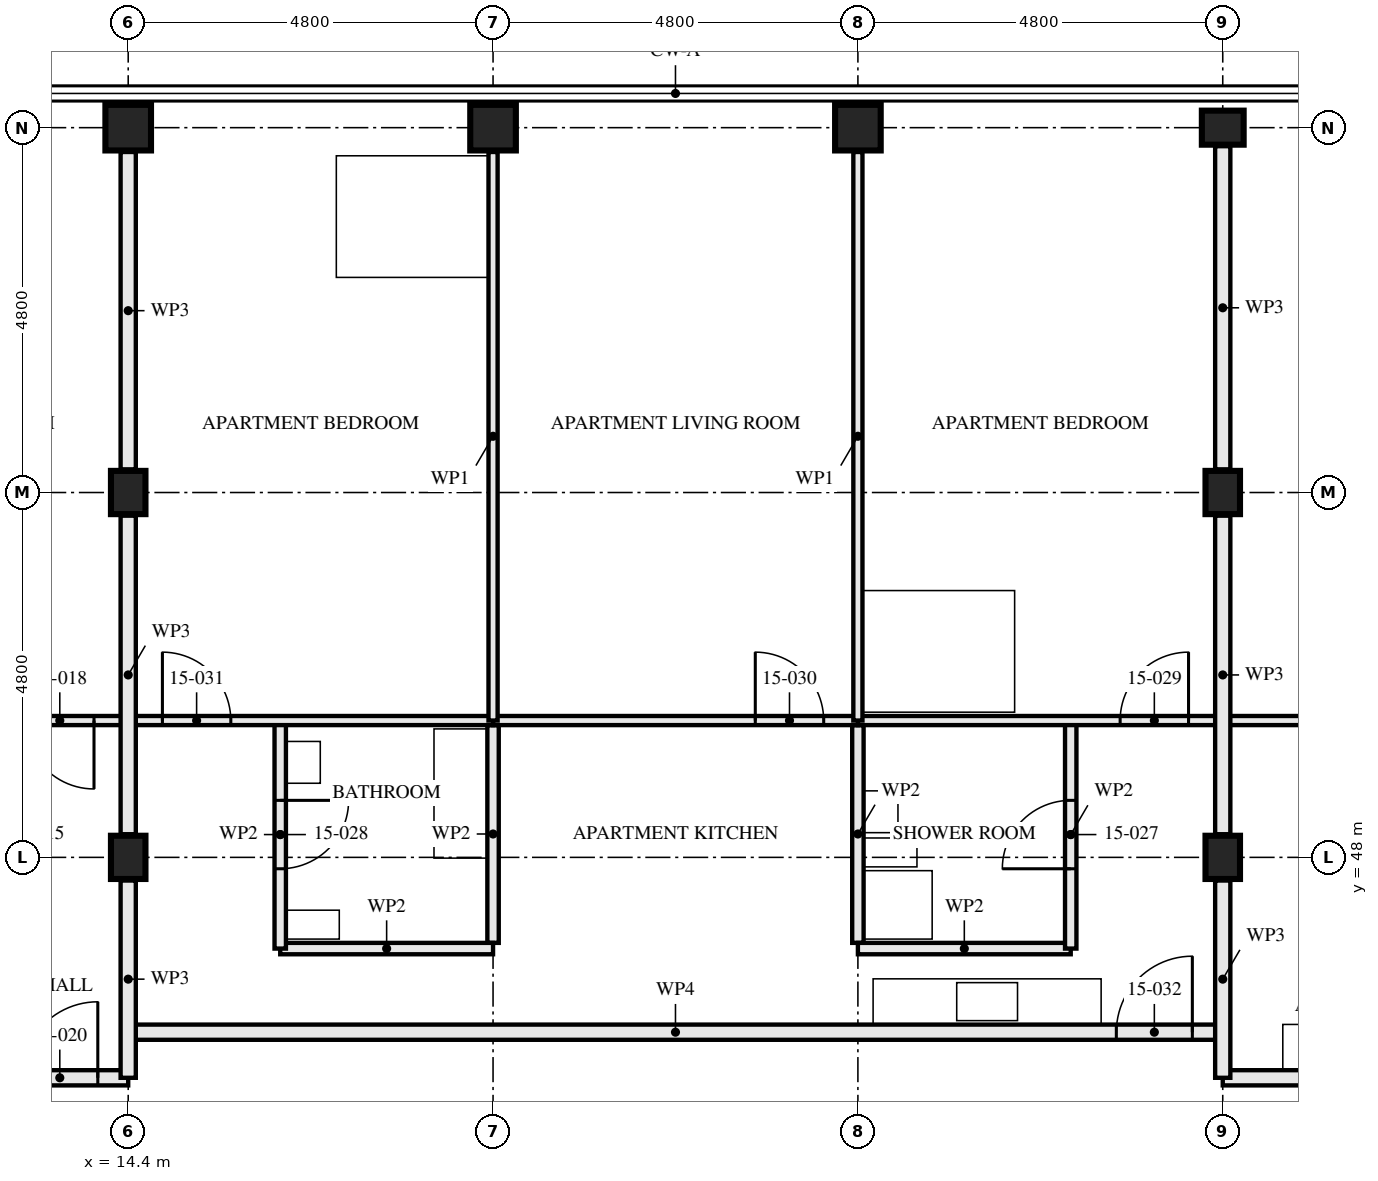
"""IFC4 building model, lengths in metres.
Left out: names, types, materials, properties, quantities, classifications, styles, units other than length and angle.
Written with IfcOpenShell. Run it as: python <this file> out.ifc"""

import sys

from ifc_helpers import new_model, si_unit, direction, frame, frame_2d, origin, origin_2d, place, context, subcontext, project, spatial, rectangle, hollow_rectangle, i_section, extrude, element, fill, save


model = new_model("IFC4")
c1 = context("Model", 3, precision=1e-05, world=origin(), true_north=direction((0.0, 1.0)))
c2 = subcontext(c1, "Body", "Model", "MODEL_VIEW")
j1 = project(units=[si_unit("LENGTHUNIT", "METRE"), si_unit("PLANEANGLEUNIT", "RADIAN")], contexts=[c1])
p1 = place(None, origin())
s1 = spatial("IfcSite", under=j1, at=p1, CompositionType="ELEMENT")
p2 = place(p1, origin())
s2 = spatial("IfcBuilding", under=s1, at=p2, CompositionType="ELEMENT")
p3 = place(p2, frame((0.0, 0.0, 58.5)))
s3 = spatial("IfcBuildingStorey", under=s2, at=p3, CompositionType="ELEMENT", Elevation=58.5)
for number, where, z_axis, x_axis in (
    (1, (14.4, 48.0, 0.0), (0.0, 0.0, 1.0), (1.0, 0.0, 0.0)),
    (2, (14.4, 52.8, 0.0), (0.0, 0.0, 1.0), (1.0, 0.0, 0.0)),
):
    element("IfcColumn", number, at=place(p3, frame(where, z_axis=z_axis, x_axis=x_axis)), inside=s3, PredefinedType="COLUMN", context=c2, shape_type="SweptSolid", body=[
        extrude(i_section(OverallWidth=0.454, OverallDepth=0.569, WebThickness=0.078, FlangeThickness=0.125, FilletRadius=0.015, at=origin_2d()), origin(), (0.0, 0.0, 1.0), 3.5),
    ])
for number, where, z_axis, x_axis in (
    (3, (14.4, 57.6, 0.0), (0.0, 0.0, 1.0), (0.0, 1.0, 0.0)),
    (4, (19.2, 57.6, 0.0), (0.0, 0.0, 1.0), (0.0, 1.0, 0.0)),
    (5, (24.0, 57.6, 0.0), (0.0, 0.0, 1.0), (0.0, 1.0, 0.0)),
):
    element("IfcColumn", number, at=place(p3, frame(where, z_axis=z_axis, x_axis=x_axis)), inside=s3, PredefinedType="COLUMN", context=c2, shape_type="SweptSolid", body=[
        extrude(hollow_rectangle(XDim=0.6, YDim=0.6, WallThickness=0.08, at=origin_2d()), origin(), (0.0, 0.0, 1.0), 3.5),
    ])
for number, where, z_axis, x_axis in (
    (6, (28.8, 48.0, 0.0), (0.0, 0.0, 1.0), (1.0, 0.0, 0.0)),
    (7, (28.8, 52.8, 0.0), (0.0, 0.0, 1.0), (1.0, 0.0, 0.0)),
):
    element("IfcColumn", number, at=place(p3, frame(where, z_axis=z_axis, x_axis=x_axis)), inside=s3, PredefinedType="COLUMN", context=c2, shape_type="SweptSolid", body=[
        extrude(i_section(OverallWidth=0.454, OverallDepth=0.569, WebThickness=0.078, FlangeThickness=0.125, FilletRadius=0.015, at=origin_2d()), origin(), (0.0, 0.0, 1.0), 3.5),
    ])
p4 = place(p3, frame((28.8, 57.6, 0.0), z_axis=(0.0, 0.0, 1.0), x_axis=(0.0, 1.0, 0.0)))
e8 = element("IfcColumn", 8, at=p4, inside=s3, PredefinedType="COLUMN", context=c2, shape_type="SweptSolid", body=[
    extrude(i_section(OverallWidth=0.448, OverallDepth=0.55, WebThickness=0.072, FlangeThickness=0.115, FilletRadius=0.015, at=origin_2d()), origin(), (0.0, 0.0, 1.0), 3.5),
])
p5 = place(p3, frame((14.4, 49.8, 0.0), z_axis=(0.0, 0.0, 1.0), x_axis=(-1.0, 0.0, 0.0)))
e9 = element("IfcWall", 9, at=p5, inside=s3, PredefinedType="PARTITIONING", context=c2, shape_type="SweptSolid", body=[
    extrude(rectangle(XDim=4.8, YDim=0.12, at=frame_2d((2.4, 0.0))), origin(), (0.0, 0.0, 1.0), 3.33),
])
p6 = place(p5, frame((0.45, 0.0, 0.0)))
e10 = element("IfcOpeningElement", 10, at=p6, cuts=e9, PredefinedType="OPENING", context=c2, shape_type="SweptSolid", body=[
    extrude(rectangle(XDim=0.9, YDim=2.1, at=frame_2d((0.45, 1.05))), frame((0.0, 0.071, 0.0), z_axis=(0.0, -1.0, 0.0), x_axis=(1.0, 0.0, 0.0)), (0.0, 0.0, 1.0), 0.141),
])
p7 = place(p3, frame((14.4, 45.1, 0.0), z_axis=(0.0, 0.0, 1.0), x_axis=(-1.0, 0.0, 0.0)))
e11 = element("IfcWall", 11, at=p7, inside=s3, PredefinedType="PARTITIONING", context=c2, shape_type="SweptSolid", body=[
    extrude(rectangle(XDim=9.6, YDim=0.2, at=frame_2d((4.8, 0.0))), origin(), (0.0, 0.0, 1.0), 3.33),
])
p8 = place(p7, frame((0.4, 0.0, 0.0)))
e12 = element("IfcOpeningElement", 12, at=p8, cuts=e11, PredefinedType="OPENING", context=c2, shape_type="SweptSolid", body=[
    extrude(rectangle(XDim=1.0, YDim=2.1, at=frame_2d((0.5, 1.05))), frame((0.0, 0.111, 0.0), z_axis=(0.0, -1.0, 0.0), x_axis=(1.0, 0.0, 0.0)), (0.0, 0.0, 1.0), 0.221),
])
p9 = place(p3, frame((26.8, 49.8, 0.0), z_axis=(0.0, 0.0, 1.0), x_axis=(0.0, -1.0, 0.0)))
e13 = element("IfcWall", 13, at=p9, inside=s3, PredefinedType="PARTITIONING", context=c2, shape_type="SweptSolid", body=[
    extrude(rectangle(XDim=3.0, YDim=0.15, at=frame_2d((1.5, 0.0))), origin(), (0.0, 0.0, 1.0), 2.55),
])
p10 = place(p9, frame((1.05, 0.0, 0.0)))
e14 = element("IfcOpeningElement", 14, at=p10, cuts=e13, PredefinedType="OPENING", context=c2, shape_type="SweptSolid", body=[
    extrude(rectangle(XDim=0.9, YDim=2.1, at=frame_2d((0.45, 1.05))), frame((0.0, 0.085, 0.0), z_axis=(0.0, -1.0, 0.0), x_axis=(1.0, 0.0, 0.0)), (0.0, 0.0, 1.0), 0.171),
])
p11 = place(p3, frame((26.8, 46.8, 0.0), z_axis=(0.0, 0.0, 1.0), x_axis=(-1.0, 0.0, 0.0)))
e15 = element("IfcWall", 15, at=p11, inside=s3, PredefinedType="PARTITIONING", context=c2, shape_type="SweptSolid", body=[
    extrude(rectangle(XDim=2.8, YDim=0.15, at=frame_2d((1.4, 0.0))), origin(), (0.0, 0.0, 1.0), 3.33),
])
p12 = place(p3, frame((16.4, 49.8, 0.0), z_axis=(0.0, 0.0, 1.0), x_axis=(0.0, -1.0, 0.0)))
e16 = element("IfcWall", 16, at=p12, inside=s3, PredefinedType="PARTITIONING", context=c2, shape_type="SweptSolid", body=[
    extrude(rectangle(XDim=3.0, YDim=0.15, at=frame_2d((1.5, 0.0))), origin(), (0.0, 0.0, 1.0), 2.55),
])
p13 = place(p12, frame((1.05, 0.0, 0.0)))
e17 = element("IfcOpeningElement", 17, at=p13, cuts=e16, PredefinedType="OPENING", context=c2, shape_type="SweptSolid", body=[
    extrude(rectangle(XDim=0.9, YDim=2.1, at=frame_2d((0.45, 1.05))), frame((0.0, 0.085, 0.0), z_axis=(0.0, -1.0, 0.0), x_axis=(1.0, 0.0, 0.0)), (0.0, 0.0, 1.0), 0.171),
])
p14 = place(p3, frame((19.2, 46.8, 0.0), z_axis=(0.0, 0.0, 1.0), x_axis=(-1.0, 0.0, 0.0)))
e18 = element("IfcWall", 18, at=p14, inside=s3, PredefinedType="PARTITIONING", context=c2, shape_type="SweptSolid", body=[
    extrude(rectangle(XDim=2.8, YDim=0.15, at=frame_2d((1.4, 0.0))), origin(), (0.0, 0.0, 1.0), 3.33),
])
p15 = place(p3, frame((28.8, 49.8, 0.0), z_axis=(0.0, 0.0, 1.0), x_axis=(-1.0, 0.0, 0.0)))
e19 = element("IfcWall", 19, at=p15, inside=s3, PredefinedType="PARTITIONING", context=c2, shape_type="SweptSolid", body=[
    extrude(rectangle(XDim=4.8, YDim=0.12, at=frame_2d((2.4, 0.0))), origin(), (0.0, 0.0, 1.0), 3.33),
])
p16 = place(p15, frame((0.45, 0.0, 0.0)))
e20 = element("IfcOpeningElement", 20, at=p16, cuts=e19, PredefinedType="OPENING", context=c2, shape_type="SweptSolid", body=[
    extrude(rectangle(XDim=0.9, YDim=2.1, at=frame_2d((0.45, 1.05))), frame((0.0, 0.071, 0.0), z_axis=(0.0, -1.0, 0.0), x_axis=(1.0, 0.0, 0.0)), (0.0, 0.0, 1.0), 0.141),
])
p17 = place(p3, frame((24.0, 49.8, 0.0), z_axis=(0.0, 0.0, 1.0), x_axis=(-1.0, 0.0, 0.0)))
e21 = element("IfcWall", 21, at=p17, inside=s3, PredefinedType="PARTITIONING", context=c2, shape_type="SweptSolid", body=[
    extrude(rectangle(XDim=4.8, YDim=0.12, at=frame_2d((2.4, 0.0))), origin(), (0.0, 0.0, 1.0), 3.33),
])
p18 = place(p17, frame((0.45, 0.0, 0.0)))
e22 = element("IfcOpeningElement", 22, at=p18, cuts=e21, PredefinedType="OPENING", context=c2, shape_type="SweptSolid", body=[
    extrude(rectangle(XDim=0.9, YDim=2.1, at=frame_2d((0.45, 1.05))), frame((0.0, 0.071, 0.0), z_axis=(0.0, -1.0, 0.0), x_axis=(1.0, 0.0, 0.0)), (0.0, 0.0, 1.0), 0.141),
])
p19 = place(p3, frame((19.2, 49.8, 0.0), z_axis=(0.0, 0.0, 1.0), x_axis=(-1.0, 0.0, 0.0)))
e23 = element("IfcWall", 23, at=p19, inside=s3, PredefinedType="PARTITIONING", context=c2, shape_type="SweptSolid", body=[
    extrude(rectangle(XDim=4.8, YDim=0.12, at=frame_2d((2.4, 0.0))), origin(), (0.0, 0.0, 1.0), 3.33),
])
p20 = place(p19, frame((3.45, 0.0, 0.0)))
e24 = element("IfcOpeningElement", 24, at=p20, cuts=e23, PredefinedType="OPENING", context=c2, shape_type="SweptSolid", body=[
    extrude(rectangle(XDim=0.9, YDim=2.1, at=frame_2d((0.45, 1.05))), frame((0.0, 0.071, 0.0), z_axis=(0.0, -1.0, 0.0), x_axis=(1.0, 0.0, 0.0)), (0.0, 0.0, 1.0), 0.141),
])
for number, where, z_axis, x_axis in (
    (25, (24.0, 57.28, 0.0), (0.0, 0.0, 1.0), (0.0, -1.0, 0.0)),
    (26, (19.2, 57.28, 0.0), (0.0, 0.0, 1.0), (0.0, -1.0, 0.0)),
):
    element("IfcWall", number, at=place(p3, frame(where, z_axis=z_axis, x_axis=x_axis)), inside=s3, PredefinedType="PARTITIONING", context=c2, shape_type="SweptSolid", body=[
        extrude(rectangle(XDim=7.48, YDim=0.12, at=frame_2d((3.74, 0.0))), origin(), (0.0, 0.0, 1.0), 2.55),
    ])
p21 = place(p3, frame((28.8, 45.7, 0.0), z_axis=(0.0, 0.0, 1.0), x_axis=(-1.0, 0.0, 0.0)))
e27 = element("IfcWall", 27, at=p21, inside=s3, PredefinedType="PARTITIONING", context=c2, shape_type="SweptSolid", body=[
    extrude(rectangle(XDim=14.4, YDim=0.2, at=frame_2d((7.2, 0.0))), origin(), (0.0, 0.0, 1.0), 3.33),
])
p22 = place(p21, frame((0.4, 0.0, 0.0)))
e28 = element("IfcOpeningElement", 28, at=p22, cuts=e27, PredefinedType="OPENING", context=c2, shape_type="SweptSolid", body=[
    extrude(rectangle(XDim=1.0, YDim=2.1, at=frame_2d((0.5, 1.05))), frame((0.0, 0.111, 0.0), z_axis=(0.0, -1.0, 0.0), x_axis=(1.0, 0.0, 0.0)), (0.0, 0.0, 1.0), 0.221),
])
p23 = place(p3, frame((33.6, 49.8, 0.0), z_axis=(0.0, 0.0, 1.0), x_axis=(-1.0, 0.0, 0.0)))
e29 = element("IfcWall", 29, at=p23, inside=s3, PredefinedType="PARTITIONING", context=c2, shape_type="SweptSolid", body=[
    extrude(rectangle(XDim=4.8, YDim=0.12, at=frame_2d((2.4, 0.0))), origin(), (0.0, 0.0, 1.0), 3.33),
])
p24 = place(p3, frame((38.4, 45.1, 0.0), z_axis=(0.0, 0.0, 1.0), x_axis=(-1.0, 0.0, 0.0)))
e30 = element("IfcWall", 30, at=p24, inside=s3, PredefinedType="PARTITIONING", context=c2, shape_type="SweptSolid", body=[
    extrude(rectangle(XDim=9.6, YDim=0.2, at=frame_2d((4.8, 0.0))), origin(), (0.0, 0.0, 1.0), 3.33),
])
p25 = place(p24, frame((0.4, 0.0, 0.0)))
e31 = element("IfcOpeningElement", 31, at=p25, cuts=e30, PredefinedType="OPENING", context=c2, shape_type="SweptSolid", body=[
    extrude(rectangle(XDim=1.0, YDim=2.1, at=frame_2d((0.5, 1.05))), frame((0.0, 0.111, 0.0), z_axis=(0.0, -1.0, 0.0), x_axis=(1.0, 0.0, 0.0)), (0.0, 0.0, 1.0), 0.221),
])
p26 = place(p3, frame((14.4, 45.1, 0.0), z_axis=(0.0, 0.0, 1.0), x_axis=(0.0, 1.0, 0.0)))
e32 = element("IfcWall", 32, at=p26, inside=s3, PredefinedType="PARTITIONING", context=c2, shape_type="SweptSolid", body=[
    extrude(rectangle(XDim=2.595, YDim=0.2, at=frame_2d((1.298, 0.0))), origin(), (0.0, 0.0, 1.0), 2.32),
])
p27 = place(p3, frame((14.4, 48.304, 0.0), z_axis=(0.0, 0.0, 1.0), x_axis=(0.0, 1.0, 0.0)))
e33 = element("IfcWall", 33, at=p27, inside=s3, PredefinedType="PARTITIONING", context=c2, shape_type="SweptSolid", body=[
    extrude(rectangle(XDim=4.191, YDim=0.2, at=frame_2d((2.096, 0.0))), origin(), (0.0, 0.0, 1.0), 2.32),
])
p28 = place(p3, frame((14.4, 53.104, 0.0), z_axis=(0.0, 0.0, 1.0), x_axis=(0.0, 1.0, 0.0)))
e34 = element("IfcWall", 34, at=p28, inside=s3, PredefinedType="PARTITIONING", context=c2, shape_type="SweptSolid", body=[
    extrude(rectangle(XDim=4.176, YDim=0.2, at=frame_2d((2.088, 0.0))), origin(), (0.0, 0.0, 1.0), 2.32),
])
p29 = place(p3, frame((28.8, 45.1, 0.0), z_axis=(0.0, 0.0, 1.0), x_axis=(0.0, 1.0, 0.0)))
e35 = element("IfcWall", 35, at=p29, inside=s3, PredefinedType="PARTITIONING", context=c2, shape_type="SweptSolid", body=[
    extrude(rectangle(XDim=2.595, YDim=0.2, at=frame_2d((1.298, 0.0))), origin(), (0.0, 0.0, 1.0), 2.32),
])
p30 = place(p3, frame((28.8, 48.304, 0.0), z_axis=(0.0, 0.0, 1.0), x_axis=(0.0, 1.0, 0.0)))
e36 = element("IfcWall", 36, at=p30, inside=s3, PredefinedType="PARTITIONING", context=c2, shape_type="SweptSolid", body=[
    extrude(rectangle(XDim=4.191, YDim=0.2, at=frame_2d((2.096, 0.0))), origin(), (0.0, 0.0, 1.0), 2.32),
])
p31 = place(p3, frame((28.8, 53.104, 0.0), z_axis=(0.0, 0.0, 1.0), x_axis=(0.0, 1.0, 0.0)))
e37 = element("IfcWall", 37, at=p31, inside=s3, PredefinedType="PARTITIONING", context=c2, shape_type="SweptSolid", body=[
    extrude(rectangle(XDim=4.251, YDim=0.2, at=frame_2d((2.126, 0.0))), origin(), (0.0, 0.0, 1.0), 2.32),
])
for number, where, z_axis, x_axis in (
    (38, (24.0, 46.875, 0.0), (0.0, 0.0, 1.0), (0.0, 1.0, 0.0)),
    (39, (19.2, 49.74, 0.0), (0.0, 0.0, 1.0), (0.0, -1.0, 0.0)),
):
    element("IfcWall", number, at=place(p3, frame(where, z_axis=z_axis, x_axis=x_axis)), inside=s3, PredefinedType="PARTITIONING", context=c2, shape_type="SweptSolid", body=[
        extrude(rectangle(XDim=2.865, YDim=0.15, at=frame_2d((1.433, 0.0))), origin(), (0.0, 0.0, 1.0), 2.55),
    ])
p32 = place(p6, origin())
e40 = element("IfcDoor", 40, at=p32, inside=s3, OperationType="SINGLE_SWING_RIGHT", PredefinedType="DOOR", context=c2, shape_type="SweptSolid", body=[
    extrude(rectangle(XDim=0.9, YDim=2.1, at=frame_2d((0.45, 1.05))), frame((0.0, 0.022, 0.0), z_axis=(0.0, -1.0, 0.0), x_axis=(1.0, 0.0, 0.0)), (0.0, 0.0, 1.0), 0.044),
])
fill(e10, e40)
p33 = place(p8, frame((1.0, 0.0, 0.0), z_axis=(0.0, 0.0, 1.0), x_axis=(-1.0, 0.0, 0.0)))
e41 = element("IfcDoor", 41, at=p33, inside=s3, OperationType="SINGLE_SWING_LEFT", PredefinedType="DOOR", context=c2, shape_type="SweptSolid", body=[
    extrude(rectangle(XDim=1.0, YDim=2.1, at=frame_2d((0.5, 1.05))), frame((0.0, 0.027, 0.0), z_axis=(0.0, -1.0, 0.0), x_axis=(1.0, 0.0, 0.0)), (0.0, 0.0, 1.0), 0.054),
])
fill(e12, e41)
p34 = place(p10, frame((0.9, 0.0, 0.0), z_axis=(0.0, 0.0, 1.0), x_axis=(-1.0, 0.0, 0.0)))
e42 = element("IfcDoor", 42, at=p34, inside=s3, OperationType="SINGLE_SWING_RIGHT", PredefinedType="DOOR", context=c2, shape_type="SweptSolid", body=[
    extrude(rectangle(XDim=0.9, YDim=2.1, at=frame_2d((0.45, 1.05))), frame((0.0, 0.022, 0.0), z_axis=(0.0, -1.0, 0.0), x_axis=(1.0, 0.0, 0.0)), (0.0, 0.0, 1.0), 0.044),
])
fill(e14, e42)
p35 = place(p13, origin())
e43 = element("IfcDoor", 43, at=p35, inside=s3, OperationType="SINGLE_SWING_RIGHT", PredefinedType="DOOR", context=c2, shape_type="SweptSolid", body=[
    extrude(rectangle(XDim=0.9, YDim=2.1, at=frame_2d((0.45, 1.05))), frame((0.0, 0.022, 0.0), z_axis=(0.0, -1.0, 0.0), x_axis=(1.0, 0.0, 0.0)), (0.0, 0.0, 1.0), 0.044),
])
fill(e17, e43)
p36 = place(p16, frame((0.9, 0.0, 0.0), z_axis=(0.0, 0.0, 1.0), x_axis=(-1.0, 0.0, 0.0)))
e44 = element("IfcDoor", 44, at=p36, inside=s3, OperationType="SINGLE_SWING_LEFT", PredefinedType="DOOR", context=c2, shape_type="SweptSolid", body=[
    extrude(rectangle(XDim=0.9, YDim=2.1, at=frame_2d((0.45, 1.05))), frame((0.0, 0.022, 0.0), z_axis=(0.0, -1.0, 0.0), x_axis=(1.0, 0.0, 0.0)), (0.0, 0.0, 1.0), 0.044),
])
fill(e20, e44)
p37 = place(p18, frame((0.9, 0.0, 0.0), z_axis=(0.0, 0.0, 1.0), x_axis=(-1.0, 0.0, 0.0)))
e45 = element("IfcDoor", 45, at=p37, inside=s3, OperationType="SINGLE_SWING_RIGHT", PredefinedType="DOOR", context=c2, shape_type="SweptSolid", body=[
    extrude(rectangle(XDim=0.9, YDim=2.1, at=frame_2d((0.45, 1.05))), frame((0.0, 0.022, 0.0), z_axis=(0.0, -1.0, 0.0), x_axis=(1.0, 0.0, 0.0)), (0.0, 0.0, 1.0), 0.044),
])
fill(e22, e45)
p38 = place(p20, frame((0.9, 0.0, 0.0), z_axis=(0.0, 0.0, 1.0), x_axis=(-1.0, 0.0, 0.0)))
e46 = element("IfcDoor", 46, at=p38, inside=s3, OperationType="SINGLE_SWING_RIGHT", PredefinedType="DOOR", context=c2, shape_type="SweptSolid", body=[
    extrude(rectangle(XDim=0.9, YDim=2.1, at=frame_2d((0.45, 1.05))), frame((0.0, 0.022, 0.0), z_axis=(0.0, -1.0, 0.0), x_axis=(1.0, 0.0, 0.0)), (0.0, 0.0, 1.0), 0.044),
])
fill(e24, e46)
p39 = place(p22, frame((1.0, 0.0, 0.0), z_axis=(0.0, 0.0, 1.0), x_axis=(-1.0, 0.0, 0.0)))
e47 = element("IfcDoor", 47, at=p39, inside=s3, OperationType="SINGLE_SWING_LEFT", PredefinedType="DOOR", context=c2, shape_type="SweptSolid", body=[
    extrude(rectangle(XDim=1.0, YDim=2.1, at=frame_2d((0.5, 1.05))), frame((0.0, 0.027, 0.0), z_axis=(0.0, -1.0, 0.0), x_axis=(1.0, 0.0, 0.0)), (0.0, 0.0, 1.0), 0.054),
])
fill(e28, e47)
save(model, sys.argv[1])
